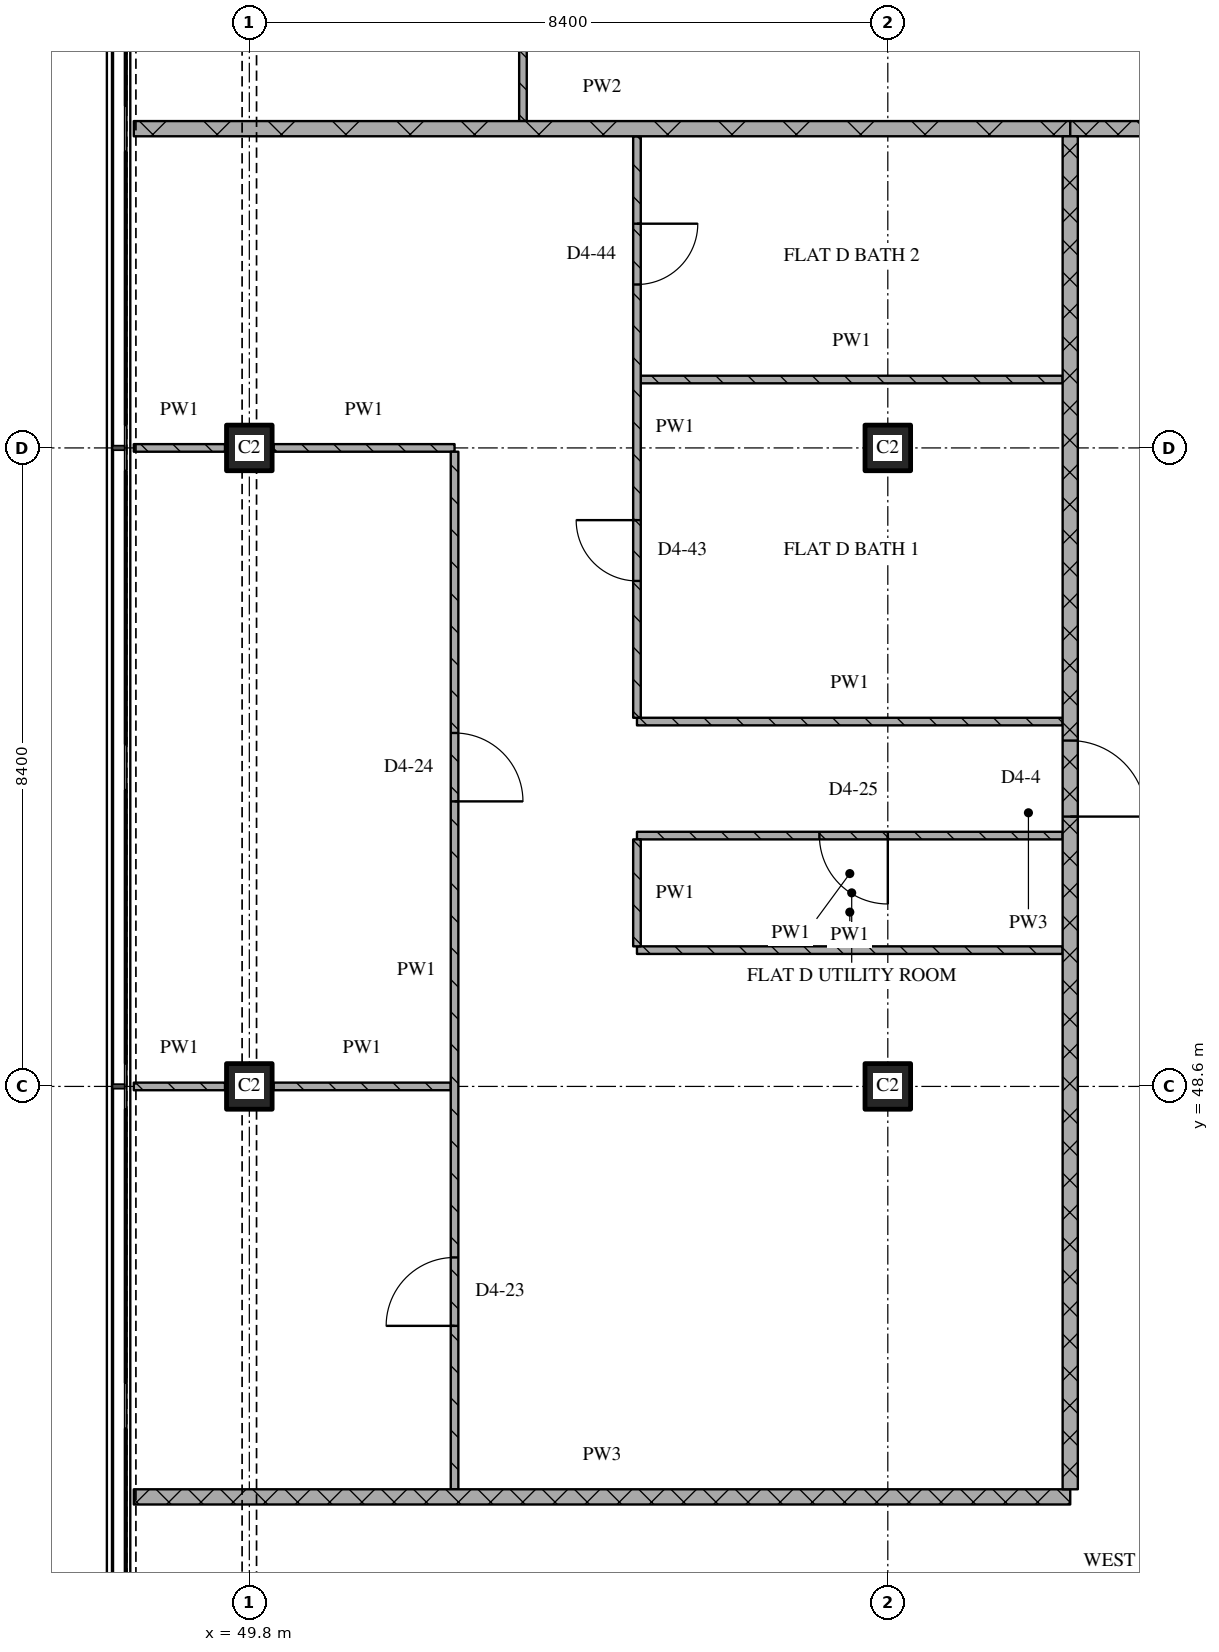
"""IFC4 building model, lengths in metres.
Left out: names, types, materials, properties, quantities, classifications, styles, units other than length and angle.
Written with IfcOpenShell. Run it as: python <this file> out.ifc"""

import sys

from ifc_helpers import new_model, si_unit, direction, frame, frame_2d, origin, origin_2d, place, context, subcontext, project, spatial, rectangle, extrude, element, fill, save


model = new_model("IFC4")
c1 = context("Model", 3, precision=1e-05, world=origin(), true_north=direction((0.0, 1.0)))
c2 = subcontext(c1, "Body", "Model", "MODEL_VIEW")
j1 = project(units=[si_unit("LENGTHUNIT", "METRE"), si_unit("PLANEANGLEUNIT", "RADIAN")], contexts=[c1])
p1 = place(None, origin())
s1 = spatial("IfcSite", under=j1, at=p1, CompositionType="ELEMENT")
p2 = place(p1, origin())
s2 = spatial("IfcBuilding", under=s1, at=p2, CompositionType="ELEMENT")
p3 = place(p2, frame((0.0, 0.0, 245.1)))
s3 = spatial("IfcBuildingStorey", under=s2, at=p3, CompositionType="ELEMENT", Elevation=245.1)
for number, where, z_axis, x_axis in (
    (1, (49.8, 48.6, 0.0), (0.0, 0.0, 1.0), (1.0, 0.0, 0.0)),
    (2, (49.8, 57.0, 0.0), (0.0, 0.0, 1.0), (1.0, 0.0, 0.0)),
    (3, (58.2, 48.6, 0.0), (0.0, 0.0, 1.0), (1.0, 0.0, 0.0)),
    (4, (58.2, 57.0, 0.0), (0.0, 0.0, 1.0), (1.0, 0.0, 0.0)),
):
    element("IfcColumn", number, at=place(p3, frame(where, z_axis=z_axis, x_axis=x_axis)), inside=s3, PredefinedType="COLUMN", context=c2, shape_type="SweptSolid", body=[
        extrude(rectangle(XDim=0.6, YDim=0.6, at=origin_2d()), origin(), (0.0, 0.0, 1.0), 3.6),
    ])
p4 = place(p3, frame((48.28, 43.2, 0.0), z_axis=(0.0, 0.0, 1.0), x_axis=(1.0, 0.0, 0.0)))
e5 = element("IfcWall", 5, at=p4, inside=s3, PredefinedType="PARTITIONING", context=c2, shape_type="SweptSolid", body=[
    extrude(rectangle(XDim=12.32, YDim=0.2, at=frame_2d((6.16, 0.0))), origin(), (0.0, 0.0, 1.0), 3.32),
])
p5 = place(p3, frame((48.28, 48.6, 0.0), z_axis=(0.0, 0.0, 1.0), x_axis=(1.0, 0.0, 0.0)))
e6 = element("IfcWall", 6, at=p5, inside=s3, PredefinedType="PARTITIONING", context=c2, shape_type="SweptSolid", body=[
    extrude(rectangle(XDim=1.2, YDim=0.1, at=frame_2d((0.6, 0.0))), origin(), (0.0, 0.0, 1.0), 3.32),
])
p6 = place(p3, frame((50.12, 48.6, 0.0), z_axis=(0.0, 0.0, 1.0), x_axis=(1.0, 0.0, 0.0)))
e7 = element("IfcWall", 7, at=p6, inside=s3, PredefinedType="PARTITIONING", context=c2, shape_type="SweptSolid", body=[
    extrude(rectangle(XDim=2.33, YDim=0.1, at=frame_2d((1.165, 0.0))), origin(), (0.0, 0.0, 1.0), 3.32),
])
p7 = place(p3, frame((54.9, 50.393, 0.0), z_axis=(0.0, 0.0, 1.0), x_axis=(1.0, 0.0, 0.0)))
e8 = element("IfcWall", 8, at=p7, inside=s3, PredefinedType="PARTITIONING", context=c2, shape_type="SweptSolid", body=[
    extrude(rectangle(XDim=5.6, YDim=0.1, at=frame_2d((2.8, 0.0))), origin(), (0.0, 0.0, 1.0), 3.32),
])
p8 = place(p3, frame((60.5, 51.9, 0.0), z_axis=(0.0, 0.0, 1.0), x_axis=(-1.0, 0.0, 0.0)))
e9 = element("IfcWall", 9, at=p8, inside=s3, PredefinedType="PARTITIONING", context=c2, shape_type="SweptSolid", body=[
    extrude(rectangle(XDim=5.6, YDim=0.1, at=frame_2d((2.8, 0.0))), origin(), (0.0, 0.0, 1.0), 3.32),
])
p9 = place(p8, frame((2.3, 0.0, 0.0)))
e10 = element("IfcOpeningElement", 10, at=p9, cuts=e9, PredefinedType="OPENING", context=c2, shape_type="SweptSolid", body=[
    extrude(rectangle(XDim=0.9, YDim=2.1, at=frame_2d((0.45, 1.05))), frame((0.0, 0.06, 0.0), z_axis=(0.0, -1.0, 0.0), x_axis=(1.0, 0.0, 0.0)), (0.0, 0.0, 1.0), 0.12),
])
p10 = place(p3, frame((54.9, 53.4, 0.0), z_axis=(0.0, 0.0, 1.0), x_axis=(1.0, 0.0, 0.0)))
e11 = element("IfcWall", 11, at=p10, inside=s3, PredefinedType="PARTITIONING", context=c2, shape_type="SweptSolid", body=[
    extrude(rectangle(XDim=5.6, YDim=0.1, at=frame_2d((2.8, 0.0))), origin(), (0.0, 0.0, 1.0), 3.32),
])
p11 = place(p3, frame((48.28, 57.0, 0.0), z_axis=(0.0, 0.0, 1.0), x_axis=(1.0, 0.0, 0.0)))
e12 = element("IfcWall", 12, at=p11, inside=s3, PredefinedType="PARTITIONING", context=c2, shape_type="SweptSolid", body=[
    extrude(rectangle(XDim=1.2, YDim=0.1, at=frame_2d((0.6, 0.0))), origin(), (0.0, 0.0, 1.0), 3.32),
])
p12 = place(p3, frame((50.12, 57.0, 0.0), z_axis=(0.0, 0.0, 1.0), x_axis=(1.0, 0.0, 0.0)))
e13 = element("IfcWall", 13, at=p12, inside=s3, PredefinedType="PARTITIONING", context=c2, shape_type="SweptSolid", body=[
    extrude(rectangle(XDim=2.38, YDim=0.1, at=frame_2d((1.19, 0.0))), origin(), (0.0, 0.0, 1.0), 3.32),
])
p13 = place(p3, frame((54.95, 57.9, 0.0), z_axis=(0.0, 0.0, 1.0), x_axis=(1.0, 0.0, 0.0)))
e14 = element("IfcWall", 14, at=p13, inside=s3, PredefinedType="PARTITIONING", context=c2, shape_type="SweptSolid", body=[
    extrude(rectangle(XDim=5.55, YDim=0.1, at=frame_2d((2.775, 0.0))), origin(), (0.0, 0.0, 1.0), 3.32),
])
p14 = place(p3, frame((60.6, 61.2, 0.0), z_axis=(0.0, 0.0, 1.0), x_axis=(1.0, 0.0, 0.0)))
e15 = element("IfcWall", 15, at=p14, inside=s3, PredefinedType="PARTITIONING", context=c2, shape_type="SweptSolid", body=[
    extrude(rectangle(XDim=3.6, YDim=0.2, at=frame_2d((1.8, 0.0))), origin(), (0.0, 0.0, 1.0), 3.32),
])
p15 = place(p3, frame((48.28, 61.2, 0.0), z_axis=(0.0, 0.0, 1.0), x_axis=(1.0, 0.0, 0.0)))
e16 = element("IfcWall", 16, at=p15, inside=s3, PredefinedType="PARTITIONING", context=c2, shape_type="SweptSolid", body=[
    extrude(rectangle(XDim=12.32, YDim=0.2, at=frame_2d((6.16, 0.0))), origin(), (0.0, 0.0, 1.0), 3.32),
])
p16 = place(p3, frame((52.5, 43.3, 0.0), z_axis=(0.0, 0.0, 1.0), x_axis=(0.0, 1.0, 0.0)))
e17 = element("IfcWall", 17, at=p16, inside=s3, PredefinedType="PARTITIONING", context=c2, shape_type="SweptSolid", body=[
    extrude(rectangle(XDim=13.65, YDim=0.1, at=frame_2d((6.825, 0.0))), origin(), (0.0, 0.0, 1.0), 3.32),
])
p17 = place(p16, frame((2.15, 0.0, 0.0)))
e18 = element("IfcOpeningElement", 18, at=p17, cuts=e17, PredefinedType="OPENING", context=c2, shape_type="SweptSolid", body=[
    extrude(rectangle(XDim=0.9, YDim=2.1, at=frame_2d((0.45, 1.05))), frame((0.0, 0.06, 0.0), z_axis=(0.0, -1.0, 0.0), x_axis=(1.0, 0.0, 0.0)), (0.0, 0.0, 1.0), 0.12),
])
p18 = place(p16, frame((9.05, 0.0, 0.0)))
e19 = element("IfcOpeningElement", 19, at=p18, cuts=e17, PredefinedType="OPENING", context=c2, shape_type="SweptSolid", body=[
    extrude(rectangle(XDim=0.9, YDim=2.1, at=frame_2d((0.45, 1.05))), frame((0.0, 0.06, 0.0), z_axis=(0.0, -1.0, 0.0), x_axis=(1.0, 0.0, 0.0)), (0.0, 0.0, 1.0), 0.12),
])
p19 = place(p3, frame((53.4, 61.3, 0.0), z_axis=(0.0, 0.0, 1.0), x_axis=(0.0, 1.0, 0.0)))
e20 = element("IfcWall", 20, at=p19, inside=s3, PredefinedType="PARTITIONING", context=c2, shape_type="SweptSolid", body=[
    extrude(rectangle(XDim=8.25, YDim=0.1, at=frame_2d((4.125, 0.0))), origin(), (0.0, 0.0, 1.0), 3.32),
])
p20 = place(p19, frame((3.65, 0.0, 0.0)))
e21 = element("IfcOpeningElement", 21, at=p20, cuts=e20, PredefinedType="OPENING", context=c2, shape_type="SweptSolid", body=[
    extrude(rectangle(XDim=0.9, YDim=2.1, at=frame_2d((0.45, 1.05))), frame((0.0, 0.06, 0.0), z_axis=(0.0, -1.0, 0.0), x_axis=(1.0, 0.0, 0.0)), (0.0, 0.0, 1.0), 0.12),
])
p21 = place(p3, frame((54.9, 51.85, 0.0), z_axis=(0.0, 0.0, 1.0), x_axis=(0.0, -1.0, 0.0)))
e22 = element("IfcWall", 22, at=p21, inside=s3, PredefinedType="PARTITIONING", context=c2, shape_type="SweptSolid", body=[
    extrude(rectangle(XDim=1.407, YDim=0.1, at=frame_2d((0.704, 0.0))), origin(), (0.0, 0.0, 1.0), 3.32),
])
p22 = place(p3, frame((54.9, 61.1, 0.0), z_axis=(0.0, 0.0, 1.0), x_axis=(0.0, -1.0, 0.0)))
e23 = element("IfcWall", 23, at=p22, inside=s3, PredefinedType="PARTITIONING", context=c2, shape_type="SweptSolid", body=[
    extrude(rectangle(XDim=7.65, YDim=0.1, at=frame_2d((3.825, 0.0))), origin(), (0.0, 0.0, 1.0), 3.32),
])
p23 = place(p22, frame((1.15, 0.0, 0.0)))
e24 = element("IfcOpeningElement", 24, at=p23, cuts=e23, PredefinedType="OPENING", context=c2, shape_type="SweptSolid", body=[
    extrude(rectangle(XDim=0.8, YDim=2.1, at=frame_2d((0.4, 1.05))), frame((0.0, 0.06, 0.0), z_axis=(0.0, -1.0, 0.0), x_axis=(1.0, 0.0, 0.0)), (0.0, 0.0, 1.0), 0.12),
])
p24 = place(p22, frame((5.05, 0.0, 0.0)))
e25 = element("IfcOpeningElement", 25, at=p24, cuts=e23, PredefinedType="OPENING", context=c2, shape_type="SweptSolid", body=[
    extrude(rectangle(XDim=0.8, YDim=2.1, at=frame_2d((0.4, 1.05))), frame((0.0, 0.06, 0.0), z_axis=(0.0, -1.0, 0.0), x_axis=(1.0, 0.0, 0.0)), (0.0, 0.0, 1.0), 0.12),
])
p25 = place(p3, frame((60.6, 43.3, 0.0), z_axis=(0.0, 0.0, 1.0), x_axis=(0.0, 1.0, 0.0)))
e26 = element("IfcWall", 26, at=p25, inside=s3, PredefinedType="PARTITIONING", context=c2, shape_type="SweptSolid", body=[
    extrude(rectangle(XDim=17.8, YDim=0.2, at=frame_2d((8.9, 0.0))), origin(), (0.0, 0.0, 1.0), 3.32),
])
p26 = place(p25, frame((8.85, 0.0, 0.0)))
e27 = element("IfcOpeningElement", 27, at=p26, cuts=e26, PredefinedType="OPENING", context=c2, shape_type="SweptSolid", body=[
    extrude(rectangle(XDim=1.0, YDim=2.1, at=frame_2d((0.5, 1.05))), frame((0.0, 0.11, 0.0), z_axis=(0.0, -1.0, 0.0), x_axis=(1.0, 0.0, 0.0)), (0.0, 0.0, 1.0), 0.22),
])
p27 = place(p9, origin())
e28 = element("IfcDoor", 28, at=p27, inside=s3, OperationType="SINGLE_SWING_LEFT", PredefinedType="DOOR", context=c2, shape_type="SweptSolid", body=[
    extrude(rectangle(XDim=0.9, YDim=2.1, at=frame_2d((0.45, 1.05))), frame((0.0, 0.025, 0.0), z_axis=(0.0, -1.0, 0.0), x_axis=(1.0, 0.0, 0.0)), (0.0, 0.0, 1.0), 0.05),
])
fill(e10, e28)
p28 = place(p17, origin())
e29 = element("IfcDoor", 29, at=p28, inside=s3, OperationType="SINGLE_SWING_LEFT", PredefinedType="DOOR", context=c2, shape_type="SweptSolid", body=[
    extrude(rectangle(XDim=0.9, YDim=2.1, at=frame_2d((0.45, 1.05))), frame((0.0, 0.025, 0.0), z_axis=(0.0, -1.0, 0.0), x_axis=(1.0, 0.0, 0.0)), (0.0, 0.0, 1.0), 0.05),
])
fill(e18, e29)
p29 = place(p18, origin())
e30 = element("IfcDoor", 30, at=p29, inside=s3, OperationType="SINGLE_SWING_RIGHT", PredefinedType="DOOR", context=c2, shape_type="SweptSolid", body=[
    extrude(rectangle(XDim=0.9, YDim=2.1, at=frame_2d((0.45, 1.05))), frame((0.0, 0.025, 0.0), z_axis=(0.0, -1.0, 0.0), x_axis=(1.0, 0.0, 0.0)), (0.0, 0.0, 1.0), 0.05),
])
fill(e19, e30)
p30 = place(p23, origin())
e31 = element("IfcDoor", 31, at=p30, inside=s3, OperationType="SINGLE_SWING_LEFT", PredefinedType="DOOR", context=c2, shape_type="SweptSolid", body=[
    extrude(rectangle(XDim=0.8, YDim=2.1, at=frame_2d((0.4, 1.05))), frame((0.0, 0.025, 0.0), z_axis=(0.0, -1.0, 0.0), x_axis=(1.0, 0.0, 0.0)), (0.0, 0.0, 1.0), 0.05),
])
fill(e24, e31)
p31 = place(p24, origin())
e32 = element("IfcDoor", 32, at=p31, inside=s3, OperationType="SINGLE_SWING_RIGHT", PredefinedType="DOOR", context=c2, shape_type="SweptSolid", body=[
    extrude(rectangle(XDim=0.8, YDim=2.1, at=frame_2d((0.4, 1.05))), frame((0.0, 0.025, 0.0), z_axis=(0.0, -1.0, 0.0), x_axis=(1.0, 0.0, 0.0)), (0.0, 0.0, 1.0), 0.05),
])
fill(e25, e32)
p32 = place(p26, origin())
e33 = element("IfcDoor", 33, at=p32, inside=s3, OperationType="SINGLE_SWING_RIGHT", PredefinedType="DOOR", context=c2, shape_type="SweptSolid", body=[
    extrude(rectangle(XDim=1.0, YDim=2.1, at=frame_2d((0.5, 1.05))), frame((0.0, 0.025, 0.0), z_axis=(0.0, -1.0, 0.0), x_axis=(1.0, 0.0, 0.0)), (0.0, 0.0, 1.0), 0.05),
])
fill(e27, e33)
save(model, sys.argv[1])
